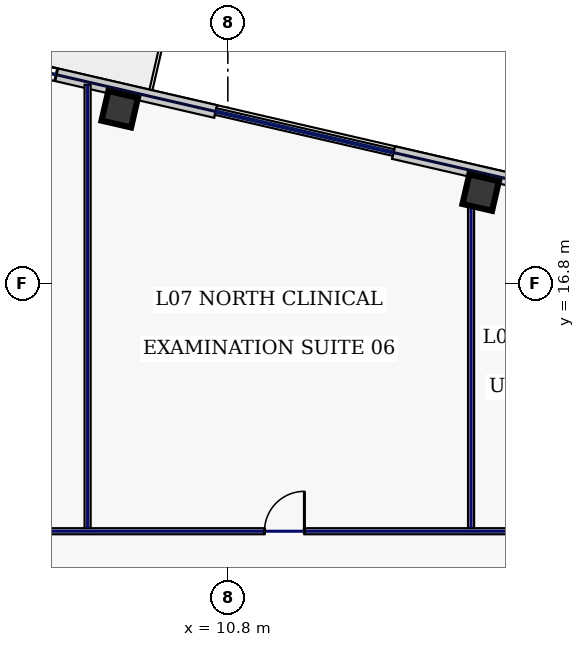
"""IFC4 building model, lengths in metres.
Left out: names, types, materials, properties, quantities, classifications, styles, units other than length and angle.
Written with IfcOpenShell. Run it as: python <this file> out.ifc"""

import sys

from ifc_helpers import new_model, si_unit, direction, frame, frame_2d, origin, origin_2d, place, context, subcontext, project, spatial, rectangle, hollow_rectangle, extrude, element, fill, save


model = new_model("IFC4")
c1 = context("Model", 3, precision=1e-05, world=origin(), true_north=direction((0.0, 1.0)))
c2 = subcontext(c1, "Body", "Model", "MODEL_VIEW")
j1 = project(units=[si_unit("LENGTHUNIT", "METRE"), si_unit("PLANEANGLEUNIT", "RADIAN")], contexts=[c1])
p1 = place(None, origin())
s1 = spatial("IfcSite", under=j1, at=p1, CompositionType="ELEMENT")
p2 = place(p1, origin())
s2 = spatial("IfcBuilding", under=s1, at=p2, CompositionType="ELEMENT")
p3 = place(p2, frame((0.0, 0.0, 39.4)))
s3 = spatial("IfcBuildingStorey", under=s2, at=p3, CompositionType="ELEMENT", Elevation=39.4)
for number, where, z_axis, x_axis in (
    (1, (17.454, 19.192, 0.0), (0.0, 0.0, 1.0), (0.974, -0.225, 0.0)),
    (2, (7.955, 21.385, 0.0), (0.0, 0.0, 1.0), (0.974, -0.225, 0.0)),
):
    element("IfcColumn", number, at=place(p3, frame(where, z_axis=z_axis, x_axis=x_axis)), inside=s3, PredefinedType="COLUMN", context=c2, shape_type="SweptSolid", body=[
        extrude(hollow_rectangle(XDim=0.8, YDim=0.8, WallThickness=0.036, at=origin_2d()), origin(), (0.0, 0.0, 1.0), 3.74),
    ])
p4 = place(p3, frame((37.229, 15.15, 0.0), z_axis=(0.0, 0.0, 1.0), x_axis=(-0.97436993772, 0.224951604723, 0.0)))
e3 = element("IfcWall", 3, at=p4, inside=s3, PredefinedType="STANDARD", context=c2, shape_type="SweptSolid", body=[
    extrude(rectangle(XDim=22.651, YDim=0.34, at=frame_2d((11.326, 0.0))), origin(), (0.0, 0.0, 1.0), 3.74),
])
p5 = place(p4, frame((16.745, 0.0, 0.22)))
e4 = element("IfcOpeningElement", 4, at=p5, cuts=e3, PredefinedType="OPENING", context=c2, shape_type="SweptSolid", body=[
    extrude(rectangle(XDim=1.6, YDim=1.2, at=frame_2d((0.8, 0.6))), frame((0.0, 0.18, 0.0), z_axis=(0.0, -1.0, 0.0), x_axis=(1.0, 0.0, 0.0)), (0.0, 0.0, 1.0), 0.36),
])
p6 = place(p4, frame((2.512, 0.0, 0.22)))
e5 = element("IfcOpeningElement", 5, at=p6, cuts=e3, PredefinedType="OPENING", context=c2, shape_type="SweptSolid", body=[
    extrude(rectangle(XDim=1.6, YDim=1.2, at=frame_2d((0.8, 0.6))), frame((0.0, 0.18, 0.0), z_axis=(0.0, -1.0, 0.0), x_axis=(1.0, 0.0, 0.0)), (0.0, 0.0, 1.0), 0.36),
])
p7 = place(p3, frame((10.481, 21.325, 0.0), z_axis=(0.0, 0.0, 1.0), x_axis=(-0.974369353393, 0.2249541357, 0.0)))
e6 = element("IfcWall", 6, at=p7, inside=s3, PredefinedType="STANDARD", context=c2, shape_type="SweptSolid", body=[
    extrude(rectangle(XDim=14.697, YDim=0.34, at=frame_2d((7.349, 0.0))), origin(), (0.0, 0.0, 1.0), 3.74),
])
p8 = place(p7, frame((6.649, 0.0, 0.0)))
e7 = element("IfcOpeningElement", 7, at=p8, cuts=e6, PredefinedType="OPENING", context=c2, shape_type="SweptSolid", body=[
    extrude(rectangle(XDim=1.4, YDim=2.2, at=frame_2d((0.7, 1.1))), frame((0.0, 0.18, 0.0), z_axis=(0.0, -1.0, 0.0), x_axis=(1.0, 0.0, 0.0)), (0.0, 0.0, 1.0), 0.36),
])
p9 = place(p7, frame((8.791, 0.0, 0.22)))
e8 = element("IfcOpeningElement", 8, at=p9, cuts=e6, PredefinedType="OPENING", context=c2, shape_type="SweptSolid", body=[
    extrude(rectangle(XDim=1.6, YDim=1.2, at=frame_2d((0.8, 0.6))), frame((0.0, 0.18, 0.0), z_axis=(0.0, -1.0, 0.0), x_axis=(1.0, 0.0, 0.0)), (0.0, 0.0, 1.0), 0.36),
])
p10 = place(p7, frame((4.306, 0.0, 0.22)))
e9 = element("IfcOpeningElement", 9, at=p10, cuts=e6, PredefinedType="OPENING", context=c2, shape_type="SweptSolid", body=[
    extrude(rectangle(XDim=1.6, YDim=1.2, at=frame_2d((0.8, 0.6))), frame((0.0, 0.18, 0.0), z_axis=(0.0, -1.0, 0.0), x_axis=(1.0, 0.0, 0.0)), (0.0, 0.0, 1.0), 0.36),
])
p11 = place(p3, frame((-29.415, 10.28, 0.0), z_axis=(0.0, 0.0, 1.0), x_axis=(1.0, 0.0, 0.0)))
e10 = element("IfcWall", 10, at=p11, inside=s3, PredefinedType="PARTITIONING", context=c2, shape_type="SweptSolid", body=[
    extrude(rectangle(XDim=58.83, YDim=0.16, at=frame_2d((29.415, 0.0))), origin(), (0.0, 0.0, 1.0), 3.74),
])
p12 = place(p11, frame((2.044, 0.0, 0.0)))
e11 = element("IfcOpeningElement", 11, at=p12, cuts=e10, PredefinedType="OPENING", context=c2, shape_type="SweptSolid", body=[
    extrude(rectangle(XDim=0.95, YDim=2.2, at=frame_2d((0.475, 1.1))), frame((0.0, 0.09, 0.0), z_axis=(0.0, -1.0, 0.0), x_axis=(1.0, 0.0, 0.0)), (0.0, 0.0, 1.0), 0.18),
])
p13 = place(p11, frame((6.647, 0.0, 0.0)))
e12 = element("IfcOpeningElement", 12, at=p13, cuts=e10, PredefinedType="OPENING", context=c2, shape_type="SweptSolid", body=[
    extrude(rectangle(XDim=1.3, YDim=2.2, at=frame_2d((0.65, 1.1))), frame((0.0, 0.09, 0.0), z_axis=(0.0, -1.0, 0.0), x_axis=(1.0, 0.0, 0.0)), (0.0, 0.0, 1.0), 0.18),
])
p14 = place(p11, frame((11.492, 0.0, 0.0)))
e13 = element("IfcOpeningElement", 13, at=p14, cuts=e10, PredefinedType="OPENING", context=c2, shape_type="SweptSolid", body=[
    extrude(rectangle(XDim=1.3, YDim=2.2, at=frame_2d((0.65, 1.1))), frame((0.0, 0.09, 0.0), z_axis=(0.0, -1.0, 0.0), x_axis=(1.0, 0.0, 0.0)), (0.0, 0.0, 1.0), 0.18),
])
p15 = place(p11, frame((16.555, 0.0, 0.0)))
e14 = element("IfcOpeningElement", 14, at=p15, cuts=e10, PredefinedType="OPENING", context=c2, shape_type="SweptSolid", body=[
    extrude(rectangle(XDim=1.3, YDim=2.2, at=frame_2d((0.65, 1.1))), frame((0.0, 0.09, 0.0), z_axis=(0.0, -1.0, 0.0), x_axis=(1.0, 0.0, 0.0)), (0.0, 0.0, 1.0), 0.18),
])
p16 = place(p11, frame((22.01, 0.0, 0.0)))
e15 = element("IfcOpeningElement", 15, at=p16, cuts=e10, PredefinedType="OPENING", context=c2, shape_type="SweptSolid", body=[
    extrude(rectangle(XDim=0.95, YDim=2.2, at=frame_2d((0.475, 1.1))), frame((0.0, 0.09, 0.0), z_axis=(0.0, -1.0, 0.0), x_axis=(1.0, 0.0, 0.0)), (0.0, 0.0, 1.0), 0.18),
])
p17 = place(p11, frame((26.58, 0.0, 0.0)))
e16 = element("IfcOpeningElement", 16, at=p17, cuts=e10, PredefinedType="OPENING", context=c2, shape_type="SweptSolid", body=[
    extrude(rectangle(XDim=0.95, YDim=2.2, at=frame_2d((0.475, 1.1))), frame((0.0, 0.09, 0.0), z_axis=(0.0, -1.0, 0.0), x_axis=(1.0, 0.0, 0.0)), (0.0, 0.0, 1.0), 0.18),
])
p18 = place(p11, frame((32.435, 0.0, 0.0)))
e17 = element("IfcOpeningElement", 17, at=p18, cuts=e10, PredefinedType="OPENING", context=c2, shape_type="SweptSolid", body=[
    extrude(rectangle(XDim=0.95, YDim=2.2, at=frame_2d((0.475, 1.1))), frame((0.0, 0.09, 0.0), z_axis=(0.0, -1.0, 0.0), x_axis=(1.0, 0.0, 0.0)), (0.0, 0.0, 1.0), 0.18),
])
p19 = place(p11, frame((41.18, 0.0, 0.0)))
e18 = element("IfcOpeningElement", 18, at=p19, cuts=e10, PredefinedType="OPENING", context=c2, shape_type="SweptSolid", body=[
    extrude(rectangle(XDim=1.05, YDim=2.2, at=frame_2d((0.525, 1.1))), frame((0.0, 0.09, 0.0), z_axis=(0.0, -1.0, 0.0), x_axis=(1.0, 0.0, 0.0)), (0.0, 0.0, 1.0), 0.18),
])
p20 = place(p11, frame((50.025, 0.0, 0.0)))
e19 = element("IfcOpeningElement", 19, at=p20, cuts=e10, PredefinedType="OPENING", context=c2, shape_type="SweptSolid", body=[
    extrude(rectangle(XDim=0.95, YDim=2.2, at=frame_2d((0.475, 1.1))), frame((0.0, 0.09, 0.0), z_axis=(0.0, -1.0, 0.0), x_axis=(1.0, 0.0, 0.0)), (0.0, 0.0, 1.0), 0.18),
])
p21 = place(p11, frame((55.981, 0.0, 0.0)))
e20 = element("IfcOpeningElement", 20, at=p21, cuts=e10, PredefinedType="OPENING", context=c2, shape_type="SweptSolid", body=[
    extrude(rectangle(XDim=0.95, YDim=2.2, at=frame_2d((0.475, 1.1))), frame((0.0, 0.09, 0.0), z_axis=(0.0, -1.0, 0.0), x_axis=(1.0, 0.0, 0.0)), (0.0, 0.0, 1.0), 0.18),
])
p22 = place(p3, frame((7.11, 10.365, 0.0), z_axis=(0.0, 0.0, 1.0), x_axis=(0.0, 1.0, 0.0)))
e21 = element("IfcWall", 21, at=p22, inside=s3, PredefinedType="PARTITIONING", context=c2, shape_type="SweptSolid", body=[
    extrude(rectangle(XDim=11.667, YDim=0.16, at=frame_2d((5.833, 0.0))), origin(), (0.0, 0.0, 1.0), 3.74),
])
p23 = place(p3, frame((17.2, 10.365, 0.0), z_axis=(0.0, 0.0, 1.0), x_axis=(0.0, 1.0, 0.0)))
e22 = element("IfcWall", 22, at=p23, inside=s3, PredefinedType="PARTITIONING", context=c2, shape_type="SweptSolid", body=[
    extrude(rectangle(XDim=9.337, YDim=0.16, at=frame_2d((4.668, 0.0))), origin(), (0.0, 0.0, 1.0), 3.74),
])
p24 = place(p10, origin())
e23 = element("IfcWindow", 23, at=p24, inside=s3, PartitioningType="SINGLE_PANEL", PredefinedType="WINDOW", context=c2, shape_type="SweptSolid", body=[
    extrude(rectangle(XDim=1.6, YDim=1.2, at=frame_2d((0.8, 0.6))), frame((0.0, 0.03, 0.0), z_axis=(0.0, -1.0, 0.0), x_axis=(1.0, 0.0, 0.0)), (0.0, 0.0, 1.0), 0.06),
])
fill(e9, e23)
p25 = place(p19, origin())
e24 = element("IfcDoor", 24, at=p25, inside=s3, OperationType="SINGLE_SWING_RIGHT", PredefinedType="DOOR", context=c2, shape_type="SweptSolid", body=[
    extrude(rectangle(XDim=1.05, YDim=2.2, at=frame_2d((0.525, 1.1))), frame((0.0, 0.025, 0.0), z_axis=(0.0, -1.0, 0.0), x_axis=(1.0, 0.0, 0.0)), (0.0, 0.0, 1.0), 0.05),
])
fill(e18, e24)
save(model, sys.argv[1])
